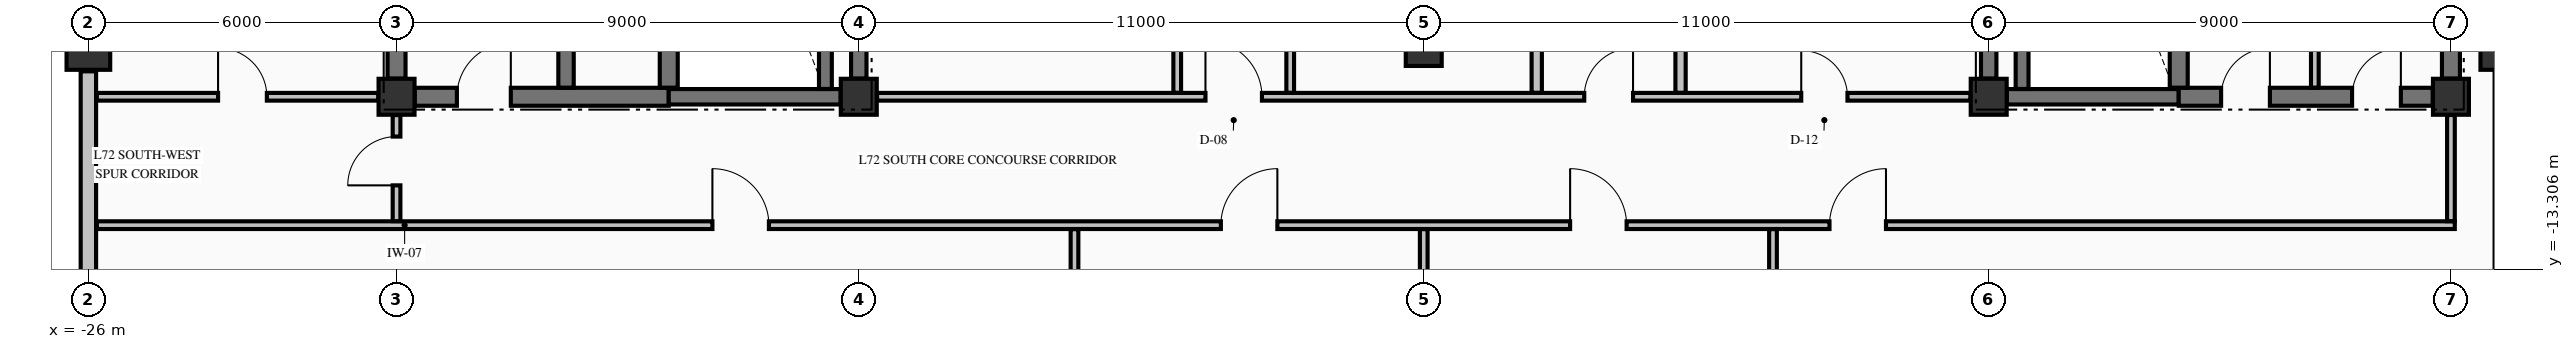
"""IFC4 building model, lengths in metres.
Left out: names, types, materials, properties, quantities, classifications, styles, units other than length and angle.
Written with IfcOpenShell. Run it as: python <this file> out.ifc"""

import sys

from ifc_helpers import new_model, si_unit, direction, frame, frame_2d, origin, origin_2d, place, context, subcontext, project, spatial, rectangle, extrude, element, fill, save


model = new_model("IFC4")
c1 = context("Model", 3, precision=1e-05, world=origin(), true_north=direction((0.0, 1.0)))
c2 = subcontext(c1, "Body", "Model", "MODEL_VIEW")
j1 = project(units=[si_unit("LENGTHUNIT", "METRE"), si_unit("PLANEANGLEUNIT", "RADIAN")], contexts=[c1])
p1 = place(None, origin())
s1 = spatial("IfcSite", under=j1, at=p1, CompositionType="ELEMENT")
p2 = place(p1, origin())
s2 = spatial("IfcBuilding", under=s1, at=p2, CompositionType="ELEMENT")
p3 = place(p2, frame((0.0, 0.0, 270.58)))
s3 = spatial("IfcBuildingStorey", under=s2, at=p3, CompositionType="ELEMENT", Elevation=270.58)
for number, where, z_axis, x_axis in (
    (1, (-26.0, -9.0, -0.325), (0.0, 0.0, 1.0), (1.0, 0.0, 0.0)),
    (2, (21.0, -9.0, -0.325), (0.0, 0.0, 1.0), (1.0, 0.0, 0.0)),
):
    element("IfcColumn", number, at=place(p3, frame(where, z_axis=z_axis, x_axis=x_axis)), inside=s3, PredefinedType="COLUMN", context=c2, shape_type="SweptSolid", body=[
        extrude(rectangle(XDim=0.85, YDim=0.85, at=origin_2d()), origin(), (0.0, 0.0, 1.0), 3.815),
    ])
for number, where, z_axis, x_axis in (
    (3, (-20.0, -9.95, -0.325), (0.0, 0.0, 1.0), (1.0, 0.0, 0.0)),
    (4, (-11.0, -9.95, -0.325), (0.0, 0.0, 1.0), (1.0, 0.0, 0.0)),
    (5, (11.0, -9.95, -0.325), (0.0, 0.0, 1.0), (1.0, 0.0, 0.0)),
    (6, (20.0, -9.95, -0.325), (0.0, 0.0, 1.0), (1.0, 0.0, 0.0)),
    (7, (0.0, -9.0, -0.325), (0.0, 0.0, 1.0), (1.0, 0.0, 0.0)),
):
    element("IfcColumn", number, at=place(p3, frame(where, z_axis=z_axis, x_axis=x_axis)), inside=s3, PredefinedType="COLUMN", context=c2, shape_type="SweptSolid", body=[
        extrude(rectangle(XDim=0.7, YDim=0.7, at=origin_2d()), origin(), (0.0, 0.0, 1.0), 3.815),
    ])
for number, where, z_axis, x_axis in (
    (8, (21.0, -17.545, 0.0), (0.0, 0.0, 1.0), (0.0, 1.0, 0.0)),
    (9, (-26.0, -9.455, 0.0), (0.0, 0.0, 1.0), (0.0, -1.0, 0.0)),
):
    element("IfcWall", number, at=place(p3, frame(where, z_axis=z_axis, x_axis=x_axis)), inside=s3, PredefinedType="STANDARD", context=c2, shape_type="SweptSolid", body=[
        extrude(rectangle(XDim=8.09, YDim=0.3, at=frame_2d((4.045, 0.0))), origin(), (0.0, 0.0, 1.0), 2.882),
    ])
p4 = place(p3, frame((-19.646, -9.95, 0.0), z_axis=(0.0, 0.0, 1.0), x_axis=(1.0, 0.0, 0.0)))
e10 = element("IfcWall", 10, at=p4, inside=s3, PredefinedType="SHEAR", context=c2, shape_type="SweptSolid", body=[
    extrude(rectangle(XDim=4.946, YDim=0.35, at=frame_2d((2.473, 0.0))), origin(), (0.0, 0.0, 1.0), 3.49),
])
p5 = place(p4, frame((0.821, 0.0, 0.0)))
e11 = element("IfcOpeningElement", 11, at=p5, cuts=e10, PredefinedType="OPENING", context=c2, shape_type="SweptSolid", body=[
    extrude(rectangle(XDim=1.05, YDim=2.15, at=frame_2d((0.525, 1.075))), frame((0.0, 0.185, 0.0), z_axis=(0.0, -1.0, 0.0), x_axis=(1.0, 0.0, 0.0)), (0.0, 0.0, 1.0), 0.37),
])
for number, where, z_axis, x_axis in (
    (12, (-14.7, -9.95, 0.0), (0.0, 0.0, 1.0), (1.0, 0.0, 0.0)),
    (13, (11.354, -9.95, 0.0), (0.0, 0.0, 1.0), (1.0, 0.0, 0.0)),
):
    element("IfcWall", number, at=place(p3, frame(where, z_axis=z_axis, x_axis=x_axis)), inside=s3, PredefinedType="SHEAR", context=c2, shape_type="SweptSolid", body=[
        extrude(rectangle(XDim=3.346, YDim=0.3, at=frame_2d((1.673, 0.0))), origin(), (0.0, 0.0, 1.0), 3.49),
    ])
p6 = place(p3, frame((14.7, -9.95, 0.0), z_axis=(0.0, 0.0, 1.0), x_axis=(1.0, 0.0, 0.0)))
e14 = element("IfcWall", 14, at=p6, inside=s3, PredefinedType="SHEAR", context=c2, shape_type="SweptSolid", body=[
    extrude(rectangle(XDim=4.946, YDim=0.35, at=frame_2d((2.473, 0.0))), origin(), (0.0, 0.0, 1.0), 3.49),
])
p7 = place(p6, frame((0.825, 0.0, 0.0)))
e15 = element("IfcOpeningElement", 15, at=p7, cuts=e14, PredefinedType="OPENING", context=c2, shape_type="SweptSolid", body=[
    extrude(rectangle(XDim=0.95, YDim=2.15, at=frame_2d((0.475, 1.075))), frame((0.0, 0.185, 0.0), z_axis=(0.0, -1.0, 0.0), x_axis=(1.0, 0.0, 0.0)), (0.0, 0.0, 1.0), 0.37),
])
p8 = place(p6, frame((3.375, 0.0, 0.0)))
e16 = element("IfcOpeningElement", 16, at=p8, cuts=e14, PredefinedType="OPENING", context=c2, shape_type="SweptSolid", body=[
    extrude(rectangle(XDim=0.95, YDim=2.15, at=frame_2d((0.475, 1.075))), frame((0.0, 0.185, 0.0), z_axis=(0.0, -1.0, 0.0), x_axis=(1.0, 0.0, 0.0)), (0.0, 0.0, 1.0), 0.37),
])
p9 = place(p3, frame((-25.835, -12.45, 0.0), z_axis=(0.0, 0.0, 1.0), x_axis=(1.0, 0.0, 0.0)))
e17 = element("IfcWall", 17, at=p9, inside=s3, PredefinedType="PARTITIONING", context=c2, shape_type="SweptSolid", body=[
    extrude(rectangle(XDim=45.91, YDim=0.15, at=frame_2d((22.955, 0.0))), origin(), (0.0, 0.0, 1.0), 3.49),
])
p10 = place(p9, frame((11.985, 0.0, 0.0)))
e18 = element("IfcOpeningElement", 18, at=p10, cuts=e17, PredefinedType="OPENING", context=c2, shape_type="SweptSolid", body=[
    extrude(rectangle(XDim=1.1, YDim=2.15, at=frame_2d((0.55, 1.075))), frame((0.0, 0.085, 0.0), z_axis=(0.0, -1.0, 0.0), x_axis=(1.0, 0.0, 0.0)), (0.0, 0.0, 1.0), 0.17),
])
p11 = place(p9, frame((21.885, 0.0, 0.0)))
e19 = element("IfcOpeningElement", 19, at=p11, cuts=e17, PredefinedType="OPENING", context=c2, shape_type="SweptSolid", body=[
    extrude(rectangle(XDim=1.1, YDim=2.15, at=frame_2d((0.55, 1.075))), frame((0.0, 0.085, 0.0), z_axis=(0.0, -1.0, 0.0), x_axis=(1.0, 0.0, 0.0)), (0.0, 0.0, 1.0), 0.17),
])
p12 = place(p9, frame((28.685, 0.0, 0.0)))
e20 = element("IfcOpeningElement", 20, at=p12, cuts=e17, PredefinedType="OPENING", context=c2, shape_type="SweptSolid", body=[
    extrude(rectangle(XDim=1.1, YDim=2.15, at=frame_2d((0.55, 1.075))), frame((0.0, 0.085, 0.0), z_axis=(0.0, -1.0, 0.0), x_axis=(1.0, 0.0, 0.0)), (0.0, 0.0, 1.0), 0.17),
])
p13 = place(p9, frame((33.735, 0.0, 0.0)))
e21 = element("IfcOpeningElement", 21, at=p13, cuts=e17, PredefinedType="OPENING", context=c2, shape_type="SweptSolid", body=[
    extrude(rectangle(XDim=1.1, YDim=2.15, at=frame_2d((0.55, 1.075))), frame((0.0, 0.085, 0.0), z_axis=(0.0, -1.0, 0.0), x_axis=(1.0, 0.0, 0.0)), (0.0, 0.0, 1.0), 0.17),
])
p14 = place(p3, frame((-25.835, -9.95, 0.0), z_axis=(0.0, 0.0, 1.0), x_axis=(1.0, 0.0, 0.0)))
e22 = element("IfcWall", 22, at=p14, inside=s3, PredefinedType="PARTITIONING", context=c2, shape_type="SweptSolid", body=[
    extrude(rectangle(XDim=5.479, YDim=0.15, at=frame_2d((2.74, 0.0))), origin(), (0.0, 0.0, 1.0), 3.49),
])
p15 = place(p14, frame((2.36, 0.0, 0.0)))
e23 = element("IfcOpeningElement", 23, at=p15, cuts=e22, PredefinedType="OPENING", context=c2, shape_type="SweptSolid", body=[
    extrude(rectangle(XDim=0.95, YDim=2.15, at=frame_2d((0.475, 1.075))), frame((0.0, 0.085, 0.0), z_axis=(0.0, -1.0, 0.0), x_axis=(1.0, 0.0, 0.0)), (0.0, 0.0, 1.0), 0.17),
])
p16 = place(p3, frame((-10.644, -9.95, 0.0), z_axis=(0.0, 0.0, 1.0), x_axis=(1.0, 0.0, 0.0)))
e24 = element("IfcWall", 24, at=p16, inside=s3, PredefinedType="PARTITIONING", context=c2, shape_type="SweptSolid", body=[
    extrude(rectangle(XDim=21.288, YDim=0.15, at=frame_2d((10.644, 0.0))), origin(), (0.0, 0.0, 1.0), 3.49),
])
p17 = place(p16, frame((6.394, 0.0, 0.0)))
e25 = element("IfcOpeningElement", 25, at=p17, cuts=e24, PredefinedType="OPENING", context=c2, shape_type="SweptSolid", body=[
    extrude(rectangle(XDim=1.1, YDim=2.15, at=frame_2d((0.55, 1.075))), frame((0.0, 0.085, 0.0), z_axis=(0.0, -1.0, 0.0), x_axis=(1.0, 0.0, 0.0)), (0.0, 0.0, 1.0), 0.17),
])
p18 = place(p16, frame((13.769, 0.0, 0.0)))
e26 = element("IfcOpeningElement", 26, at=p18, cuts=e24, PredefinedType="OPENING", context=c2, shape_type="SweptSolid", body=[
    extrude(rectangle(XDim=0.95, YDim=2.15, at=frame_2d((0.475, 1.075))), frame((0.0, 0.085, 0.0), z_axis=(0.0, -1.0, 0.0), x_axis=(1.0, 0.0, 0.0)), (0.0, 0.0, 1.0), 0.17),
])
p19 = place(p16, frame((17.994, 0.0, 0.0)))
e27 = element("IfcOpeningElement", 27, at=p19, cuts=e24, PredefinedType="OPENING", context=c2, shape_type="SweptSolid", body=[
    extrude(rectangle(XDim=0.9, YDim=2.15, at=frame_2d((0.45, 1.075))), frame((0.0, 0.085, 0.0), z_axis=(0.0, -1.0, 0.0), x_axis=(1.0, 0.0, 0.0)), (0.0, 0.0, 1.0), 0.17),
])
p20 = place(p3, frame((-20.0, -9.596, 0.0), z_axis=(0.0, 0.0, 1.0), x_axis=(0.0, 1.0, 0.0)))
e28 = element("IfcWall", 28, at=p20, inside=s3, PredefinedType="SHEAR", context=c2, shape_type="SweptSolid", body=[
    extrude(rectangle(XDim=9.242, YDim=0.35, at=frame_2d((4.621, 0.0))), origin(), (0.0, 0.0, 1.0), 3.49),
])
p21 = place(p3, frame((-16.7, -9.773, 0.0), z_axis=(0.0, 0.0, 1.0), x_axis=(0.0, 1.0, 0.0)))
e29 = element("IfcWall", 29, at=p21, inside=s3, PredefinedType="SHEAR", context=c2, shape_type="SweptSolid", body=[
    extrude(rectangle(XDim=9.371, YDim=0.3, at=frame_2d((4.686, 0.0))), origin(), (0.0, 0.0, 1.0), 3.49),
])
p22 = place(p3, frame((-14.7, -9.773, 0.0), z_axis=(0.0, 0.0, 1.0), x_axis=(0.0, 1.0, 0.0)))
e30 = element("IfcWall", 30, at=p22, inside=s3, PredefinedType="SHEAR", context=c2, shape_type="SweptSolid", body=[
    extrude(rectangle(XDim=9.371, YDim=0.35, at=frame_2d((4.686, 0.0))), origin(), (0.0, 0.0, 1.0), 3.49),
])
p23 = place(p3, frame((-11.65, -9.798, 0.0), z_axis=(0.0, 0.0, 1.0), x_axis=(0.0, 1.0, 0.0)))
e31 = element("IfcWall", 31, at=p23, inside=s3, PredefinedType="SOLIDWALL", context=c2, shape_type="SweptSolid", body=[
    extrude(rectangle(XDim=9.396, YDim=0.25, at=frame_2d((4.698, 0.0))), origin(), (0.0, 0.0, 1.0), 3.49),
])
for number, where, z_axis, x_axis in (
    (32, (-11.0, -9.596, 0.0), (0.0, 0.0, 1.0), (0.0, 1.0, 0.0)),
    (33, (11.0, -9.596, 0.0), (0.0, 0.0, 1.0), (0.0, 1.0, 0.0)),
):
    element("IfcWall", number, at=place(p3, frame(where, z_axis=z_axis, x_axis=x_axis)), inside=s3, PredefinedType="SHEAR", context=c2, shape_type="SweptSolid", body=[
        extrude(rectangle(XDim=9.242, YDim=0.3, at=frame_2d((4.621, 0.0))), origin(), (0.0, 0.0, 1.0), 3.49),
    ])
p24 = place(p3, frame((11.65, -9.798, 0.0), z_axis=(0.0, 0.0, 1.0), x_axis=(0.0, 1.0, 0.0)))
e34 = element("IfcWall", 34, at=p24, inside=s3, PredefinedType="SOLIDWALL", context=c2, shape_type="SweptSolid", body=[
    extrude(rectangle(XDim=9.396, YDim=0.25, at=frame_2d((4.698, 0.0))), origin(), (0.0, 0.0, 1.0), 3.49),
])
p25 = place(p3, frame((14.7, -9.773, 0.0), z_axis=(0.0, 0.0, 1.0), x_axis=(0.0, 1.0, 0.0)))
e35 = element("IfcWall", 35, at=p25, inside=s3, PredefinedType="SHEAR", context=c2, shape_type="SweptSolid", body=[
    extrude(rectangle(XDim=9.371, YDim=0.35, at=frame_2d((4.686, 0.0))), origin(), (0.0, 0.0, 1.0), 3.49),
])
p26 = place(p3, frame((20.0, -9.596, 0.0), z_axis=(0.0, 0.0, 1.0), x_axis=(0.0, 1.0, 0.0)))
e36 = element("IfcWall", 36, at=p26, inside=s3, PredefinedType="SHEAR", context=c2, shape_type="SweptSolid", body=[
    extrude(rectangle(XDim=14.769, YDim=0.35, at=frame_2d((7.385, 0.0))), origin(), (0.0, 0.0, 1.0), 3.49),
])
p27 = place(p3, frame((-20.0, -12.372, 0.0), z_axis=(0.0, 0.0, 1.0), x_axis=(0.0, 1.0, 0.0)))
e37 = element("IfcWall", 37, at=p27, inside=s3, PredefinedType="PARTITIONING", context=c2, shape_type="SweptSolid", body=[
    extrude(rectangle(XDim=2.066, YDim=0.15, at=frame_2d((1.033, 0.0))), origin(), (0.0, 0.0, 1.0), 3.49),
])
p28 = place(p27, frame((0.697, 0.0, 0.0)))
e38 = element("IfcOpeningElement", 38, at=p28, cuts=e37, PredefinedType="OPENING", context=c2, shape_type="SweptSolid", body=[
    extrude(rectangle(XDim=0.95, YDim=2.15, at=frame_2d((0.475, 1.075))), frame((0.0, 0.085, 0.0), z_axis=(0.0, -1.0, 0.0), x_axis=(1.0, 0.0, 0.0)), (0.0, 0.0, 1.0), 0.17),
])
p29 = place(p3, frame((-6.8, -23.335, 0.0), z_axis=(0.0, 0.0, 1.0), x_axis=(0.0, 1.0, 0.0)))
e39 = element("IfcWall", 39, at=p29, inside=s3, PredefinedType="PARTITIONING", context=c2, shape_type="SweptSolid", body=[
    extrude(rectangle(XDim=10.807, YDim=0.15, at=frame_2d((5.403, 0.0))), origin(), (0.0, 0.0, 1.0), 3.49),
])
p30 = place(p3, frame((-4.8, -9.872, 0.0), z_axis=(0.0, 0.0, 1.0), x_axis=(0.0, 1.0, 0.0)))
e40 = element("IfcWall", 40, at=p30, inside=s3, PredefinedType="PARTITIONING", context=c2, shape_type="SweptSolid", body=[
    extrude(rectangle(XDim=9.544, YDim=0.15, at=frame_2d((4.772, 0.0))), origin(), (0.0, 0.0, 1.0), 3.49),
])
p31 = place(p3, frame((-2.6, -9.872, 0.0), z_axis=(0.0, 0.0, 1.0), x_axis=(0.0, 1.0, 0.0)))
e41 = element("IfcWall", 41, at=p31, inside=s3, PredefinedType="PARTITIONING", context=c2, shape_type="SweptSolid", body=[
    extrude(rectangle(XDim=4.419, YDim=0.15, at=frame_2d((2.209, 0.0))), origin(), (0.0, 0.0, 1.0), 3.49),
])
p32 = place(p31, frame((2.597, 0.0, 0.0)))
e42 = element("IfcOpeningElement", 42, at=p32, cuts=e41, PredefinedType="OPENING", context=c2, shape_type="SweptSolid", body=[
    extrude(rectangle(XDim=0.95, YDim=2.15, at=frame_2d((0.475, 1.075))), frame((0.0, 0.085, 0.0), z_axis=(0.0, -1.0, 0.0), x_axis=(1.0, 0.0, 0.0)), (0.0, 0.0, 1.0), 0.17),
])
p33 = place(p3, frame((0.0, -23.069, 0.0), z_axis=(0.0, 0.0, 1.0), x_axis=(0.0, 1.0, 0.0)))
e43 = element("IfcWall", 43, at=p33, inside=s3, PredefinedType="PARTITIONING", context=c2, shape_type="SweptSolid", body=[
    extrude(rectangle(XDim=10.541, YDim=0.15, at=frame_2d((5.271, 0.0))), origin(), (0.0, 0.0, 1.0), 3.49),
])
for number, where, z_axis, x_axis in (
    (44, (2.2, -9.872, 0.0), (0.0, 0.0, 1.0), (0.0, 1.0, 0.0)),
    (45, (5.0, -9.872, 0.0), (0.0, 0.0, 1.0), (0.0, 1.0, 0.0)),
):
    element("IfcWall", number, at=place(p3, frame(where, z_axis=z_axis, x_axis=x_axis)), inside=s3, PredefinedType="PARTITIONING", context=c2, shape_type="SweptSolid", body=[
        extrude(rectangle(XDim=4.419, YDim=0.2, at=frame_2d((2.209, 0.0))), origin(), (0.0, 0.0, 1.0), 3.49),
    ])
p34 = place(p3, frame((6.8, -23.335, 0.0), z_axis=(0.0, 0.0, 1.0), x_axis=(0.0, 1.0, 0.0)))
e46 = element("IfcWall", 46, at=p34, inside=s3, PredefinedType="PARTITIONING", context=c2, shape_type="SweptSolid", body=[
    extrude(rectangle(XDim=10.807, YDim=0.15, at=frame_2d((5.403, 0.0))), origin(), (0.0, 0.0, 1.0), 3.49),
])
p35 = place(p3, frame((17.35, -9.772, 0.0), z_axis=(0.0, 0.0, 1.0), x_axis=(0.0, 1.0, 0.0)))
e47 = element("IfcWall", 47, at=p35, inside=s3, PredefinedType="PARTITIONING", context=c2, shape_type="SweptSolid", body=[
    extrude(rectangle(XDim=7.194, YDim=0.15, at=frame_2d((3.597, 0.0))), origin(), (0.0, 0.0, 1.0), 3.49),
])
p36 = place(p3, frame((20.0, -12.372, 0.0), z_axis=(0.0, 0.0, 1.0), x_axis=(0.0, 1.0, 0.0)))
e48 = element("IfcWall", 48, at=p36, inside=s3, PredefinedType="PARTITIONING", context=c2, shape_type="SweptSolid", body=[
    extrude(rectangle(XDim=2.066, YDim=0.15, at=frame_2d((1.033, 0.0))), origin(), (0.0, 0.0, 1.0), 3.08),
])
p37 = place(p5, origin())
e49 = element("IfcDoor", 49, at=p37, inside=s3, OperationType="SINGLE_SWING_RIGHT", PredefinedType="DOOR", context=c2, shape_type="SweptSolid", body=[
    extrude(rectangle(XDim=1.05, YDim=2.15, at=frame_2d((0.525, 1.075))), frame((0.0, 0.025, 0.0), z_axis=(0.0, -1.0, 0.0), x_axis=(1.0, 0.0, 0.0)), (0.0, 0.0, 1.0), 0.05),
])
fill(e11, e49)
p38 = place(p7, origin())
e50 = element("IfcDoor", 50, at=p38, inside=s3, OperationType="SINGLE_SWING_RIGHT", PredefinedType="DOOR", context=c2, shape_type="SweptSolid", body=[
    extrude(rectangle(XDim=0.95, YDim=2.15, at=frame_2d((0.475, 1.075))), frame((0.0, 0.025, 0.0), z_axis=(0.0, -1.0, 0.0), x_axis=(1.0, 0.0, 0.0)), (0.0, 0.0, 1.0), 0.05),
])
fill(e15, e50)
p39 = place(p8, origin())
e51 = element("IfcDoor", 51, at=p39, inside=s3, OperationType="SINGLE_SWING_RIGHT", PredefinedType="DOOR", context=c2, shape_type="SweptSolid", body=[
    extrude(rectangle(XDim=0.95, YDim=2.15, at=frame_2d((0.475, 1.075))), frame((0.0, 0.025, 0.0), z_axis=(0.0, -1.0, 0.0), x_axis=(1.0, 0.0, 0.0)), (0.0, 0.0, 1.0), 0.05),
])
fill(e16, e51)
p40 = place(p17, origin())
e52 = element("IfcDoor", 52, at=p40, inside=s3, OperationType="SINGLE_SWING_LEFT", PredefinedType="DOOR", context=c2, shape_type="SweptSolid", body=[
    extrude(rectangle(XDim=1.1, YDim=2.15, at=frame_2d((0.55, 1.075))), frame((0.0, 0.025, 0.0), z_axis=(0.0, -1.0, 0.0), x_axis=(1.0, 0.0, 0.0)), (0.0, 0.0, 1.0), 0.05),
])
fill(e25, e52)
p41 = place(p10, origin())
e53 = element("IfcDoor", 53, at=p41, inside=s3, OperationType="SINGLE_SWING_LEFT", PredefinedType="DOOR", context=c2, shape_type="SweptSolid", body=[
    extrude(rectangle(XDim=1.1, YDim=2.15, at=frame_2d((0.55, 1.075))), frame((0.0, 0.025, 0.0), z_axis=(0.0, -1.0, 0.0), x_axis=(1.0, 0.0, 0.0)), (0.0, 0.0, 1.0), 0.05),
])
fill(e18, e53)
p42 = place(p11, origin())
e54 = element("IfcDoor", 54, at=p42, inside=s3, OperationType="SINGLE_SWING_RIGHT", PredefinedType="DOOR", context=c2, shape_type="SweptSolid", body=[
    extrude(rectangle(XDim=1.1, YDim=2.15, at=frame_2d((0.55, 1.075))), frame((0.0, 0.025, 0.0), z_axis=(0.0, -1.0, 0.0), x_axis=(1.0, 0.0, 0.0)), (0.0, 0.0, 1.0), 0.05),
])
fill(e19, e54)
p43 = place(p12, origin())
e55 = element("IfcDoor", 55, at=p43, inside=s3, OperationType="SINGLE_SWING_LEFT", PredefinedType="DOOR", context=c2, shape_type="SweptSolid", body=[
    extrude(rectangle(XDim=1.1, YDim=2.15, at=frame_2d((0.55, 1.075))), frame((0.0, 0.025, 0.0), z_axis=(0.0, -1.0, 0.0), x_axis=(1.0, 0.0, 0.0)), (0.0, 0.0, 1.0), 0.05),
])
fill(e20, e55)
p44 = place(p13, origin())
e56 = element("IfcDoor", 56, at=p44, inside=s3, OperationType="SINGLE_SWING_RIGHT", PredefinedType="DOOR", context=c2, shape_type="SweptSolid", body=[
    extrude(rectangle(XDim=1.1, YDim=2.15, at=frame_2d((0.55, 1.075))), frame((0.0, 0.025, 0.0), z_axis=(0.0, -1.0, 0.0), x_axis=(1.0, 0.0, 0.0)), (0.0, 0.0, 1.0), 0.05),
])
fill(e21, e56)
p45 = place(p18, origin())
e57 = element("IfcDoor", 57, at=p45, inside=s3, OperationType="SINGLE_SWING_RIGHT", PredefinedType="DOOR", context=c2, shape_type="SweptSolid", body=[
    extrude(rectangle(XDim=0.95, YDim=2.15, at=frame_2d((0.475, 1.075))), frame((0.0, 0.025, 0.0), z_axis=(0.0, -1.0, 0.0), x_axis=(1.0, 0.0, 0.0)), (0.0, 0.0, 1.0), 0.05),
])
fill(e26, e57)
p46 = place(p19, origin())
e58 = element("IfcDoor", 58, at=p46, inside=s3, OperationType="SINGLE_SWING_LEFT", PredefinedType="DOOR", context=c2, shape_type="SweptSolid", body=[
    extrude(rectangle(XDim=0.9, YDim=2.15, at=frame_2d((0.45, 1.075))), frame((0.0, 0.025, 0.0), z_axis=(0.0, -1.0, 0.0), x_axis=(1.0, 0.0, 0.0)), (0.0, 0.0, 1.0), 0.05),
])
fill(e27, e58)
p47 = place(p28, origin())
e59 = element("IfcDoor", 59, at=p47, inside=s3, OperationType="SINGLE_SWING_LEFT", PredefinedType="DOOR", context=c2, shape_type="SweptSolid", body=[
    extrude(rectangle(XDim=0.95, YDim=2.15, at=frame_2d((0.475, 1.075))), frame((0.0, 0.025, 0.0), z_axis=(0.0, -1.0, 0.0), x_axis=(1.0, 0.0, 0.0)), (0.0, 0.0, 1.0), 0.05),
])
fill(e38, e59)
p48 = place(p15, origin())
e60 = element("IfcDoor", 60, at=p48, inside=s3, OperationType="SINGLE_SWING_LEFT", PredefinedType="DOOR", context=c2, shape_type="SweptSolid", body=[
    extrude(rectangle(XDim=0.95, YDim=2.15, at=frame_2d((0.475, 1.075))), frame((0.0, 0.025, 0.0), z_axis=(0.0, -1.0, 0.0), x_axis=(1.0, 0.0, 0.0)), (0.0, 0.0, 1.0), 0.05),
])
fill(e23, e60)
save(model, sys.argv[1])
